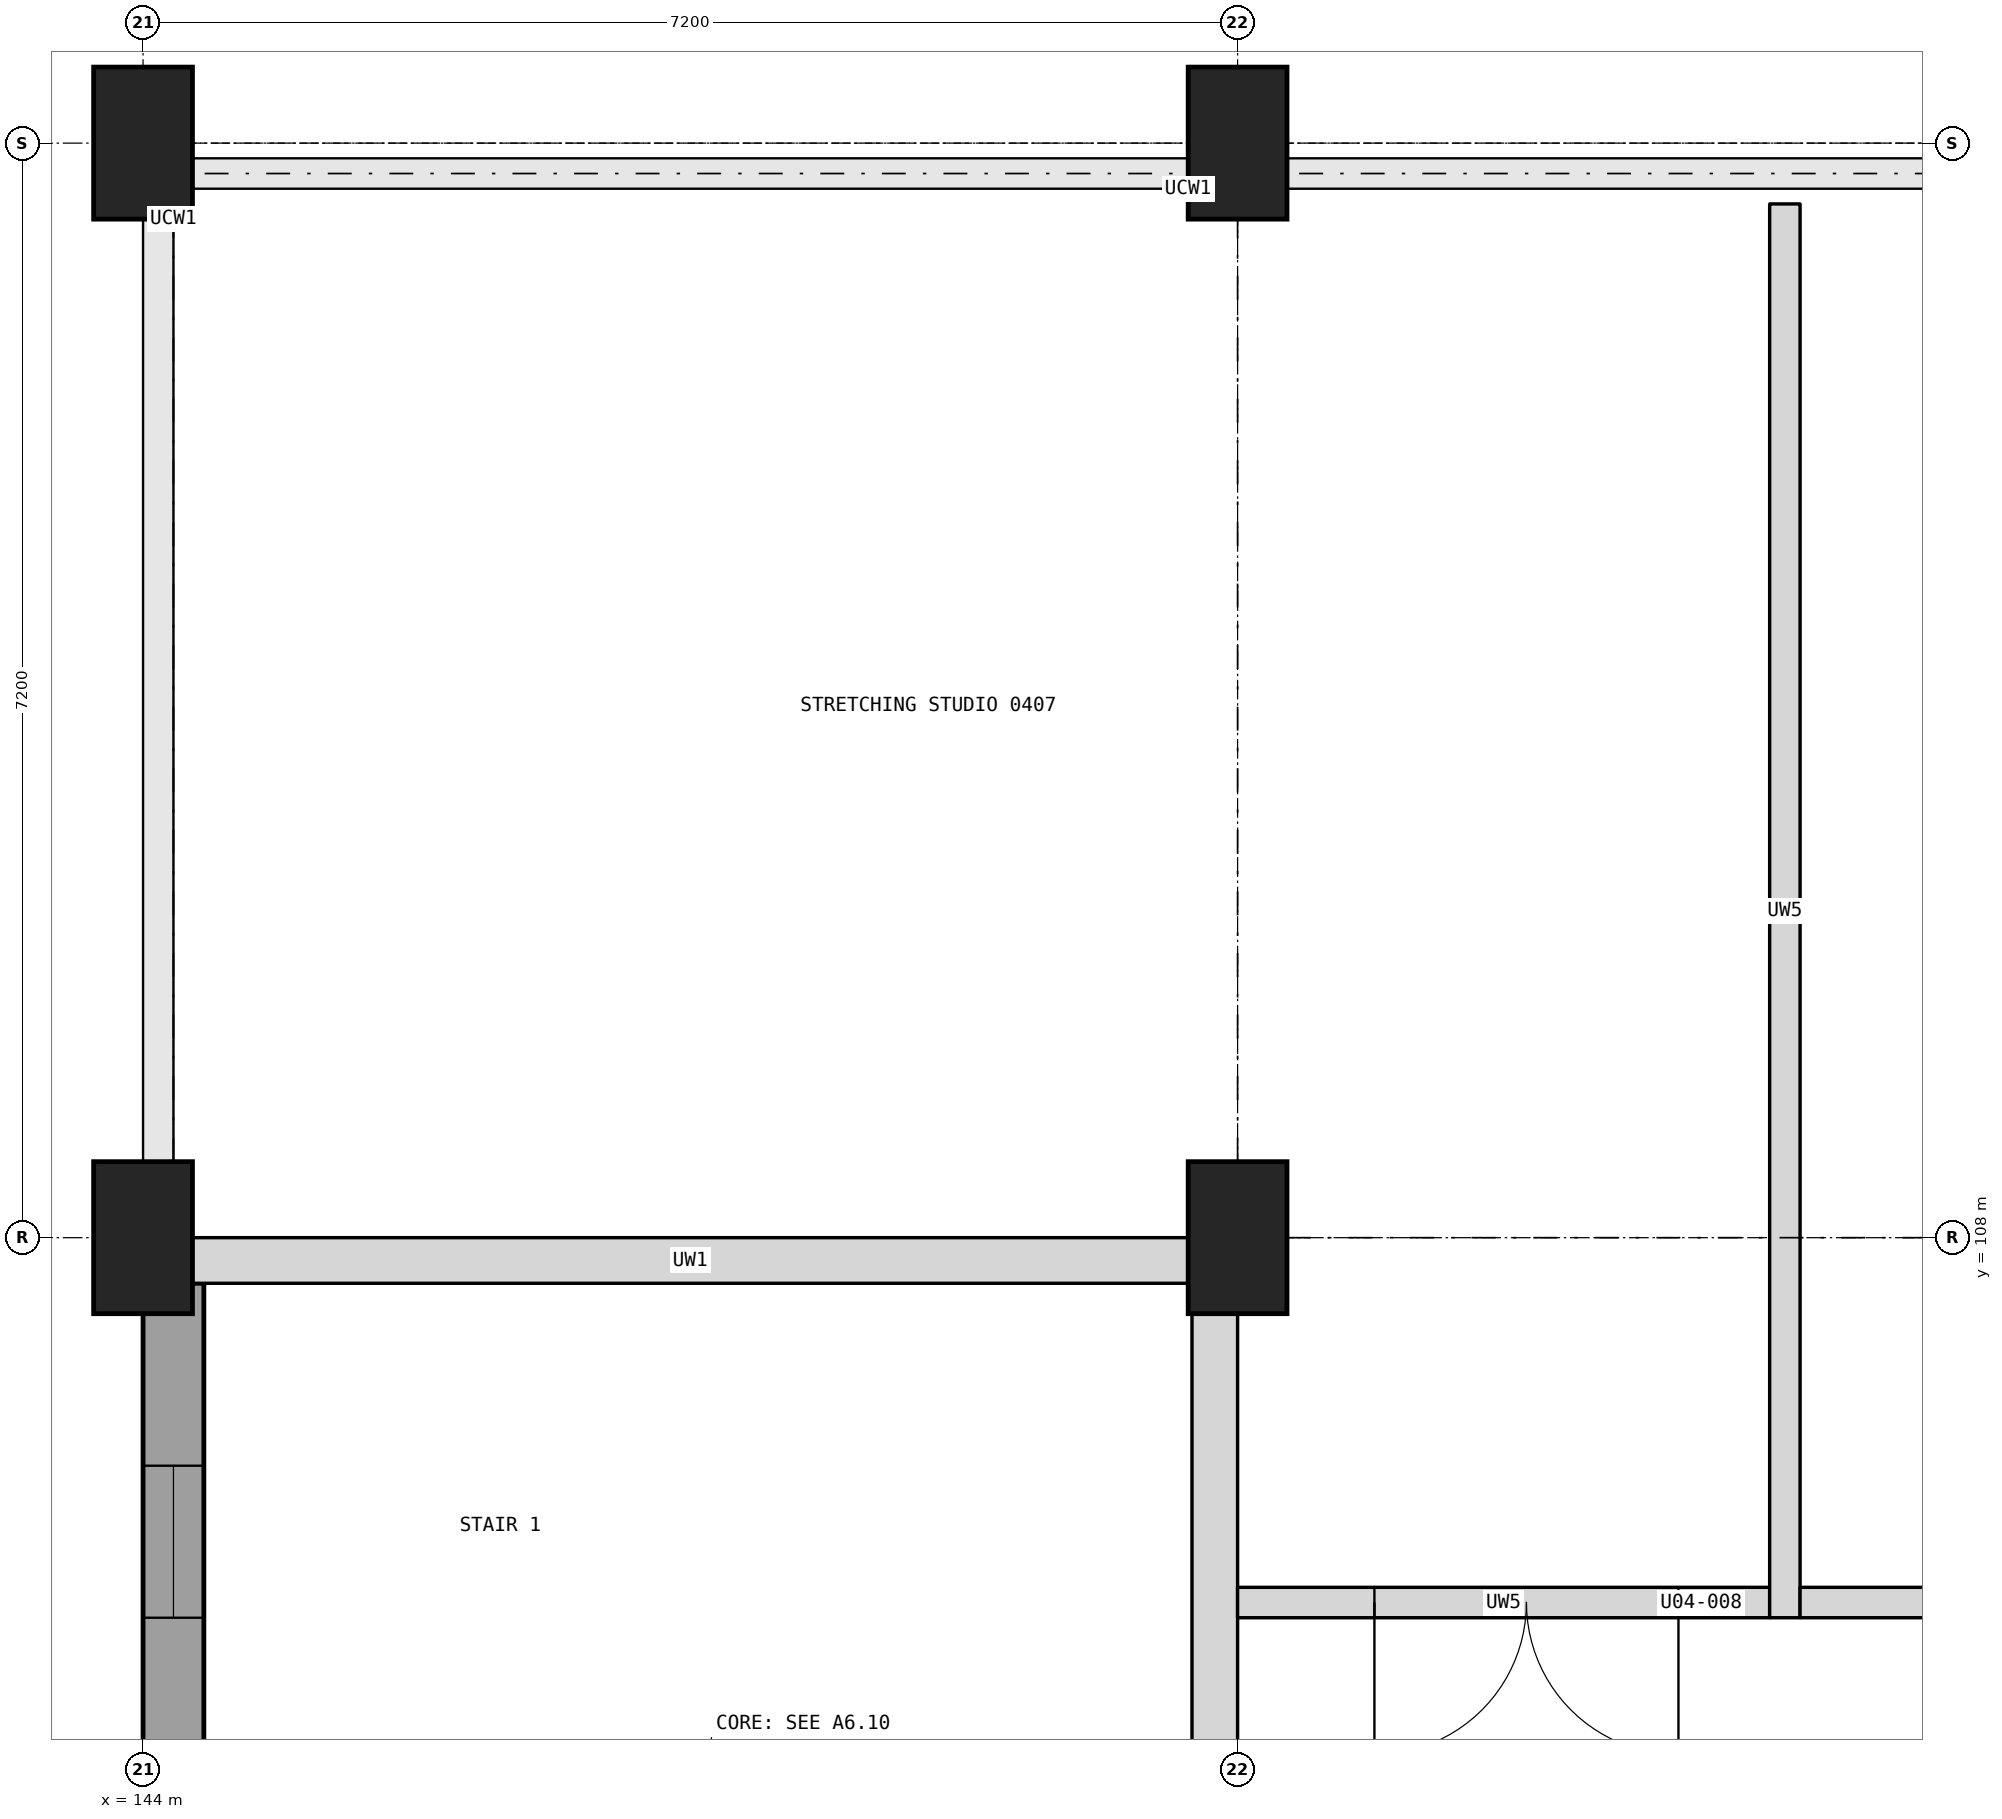
"""IFC4 building model, lengths in metres.
Left out: names, types, materials, properties, quantities, classifications, styles, units other than length and angle.
Written with IfcOpenShell. Run it as: python <this file> out.ifc"""

import sys

from ifc_helpers import new_model, si_unit, direction, frame, frame_2d, origin, origin_2d, place, context, subcontext, project, spatial, rectangle, extrude, element, fill, save


model = new_model("IFC4")
c1 = context("Model", 3, precision=1e-05, world=origin(), true_north=direction((0.0, 1.0)))
c2 = subcontext(c1, "Body", "Model", "MODEL_VIEW")
j1 = project(units=[si_unit("LENGTHUNIT", "METRE"), si_unit("PLANEANGLEUNIT", "RADIAN")], contexts=[c1])
p1 = place(None, origin())
s1 = spatial("IfcSite", under=j1, at=p1, CompositionType="ELEMENT")
p2 = place(p1, origin())
s2 = spatial("IfcBuilding", under=s1, at=p2, CompositionType="ELEMENT")
p3 = place(p2, frame((0.0, 0.0, 19.9)))
s3 = spatial("IfcBuildingStorey", under=s2, at=p3, CompositionType="ELEMENT", Elevation=19.9)
for number, where, z_axis, x_axis in (
    (1, (144.0, 108.0, 0.0), (0.0, 0.0, 1.0), (1.0, 0.0, 0.0)),
    (2, (144.0, 115.2, 0.0), (0.0, 0.0, 1.0), (1.0, 0.0, 0.0)),
    (3, (151.2, 108.0, 0.0), (0.0, 0.0, 1.0), (1.0, 0.0, 0.0)),
    (4, (151.2, 115.2, 0.0), (0.0, 0.0, 1.0), (1.0, 0.0, 0.0)),
):
    element("IfcColumn", number, at=place(p3, frame(where, z_axis=z_axis, x_axis=x_axis)), inside=s3, PredefinedType="COLUMN", context=c2, shape_type="SweptSolid", body=[
        extrude(rectangle(XDim=0.65, YDim=1.0, at=origin_2d()), origin(), (0.0, 0.0, 1.0), 3.4),
    ])
p4 = place(p3, frame((144.0, 107.85, 0.0), z_axis=(0.0, 0.0, 1.0), x_axis=(1.0, 0.0, 0.0)))
e5 = element("IfcWall", 5, at=p4, inside=s3, PredefinedType="SHEAR", context=c2, shape_type="SweptSolid", body=[
    extrude(rectangle(XDim=7.2, YDim=0.3, at=frame_2d((3.6, 0.0))), origin(), (0.0, 0.0, 1.0), 3.4),
])
p5 = place(p3, frame((151.05, 101.1, 0.0), z_axis=(0.0, 0.0, 1.0), x_axis=(0.0, 1.0, 0.0)))
e6 = element("IfcWall", 6, at=p5, inside=s3, PredefinedType="SHEAR", context=c2, shape_type="SweptSolid", body=[
    extrude(rectangle(XDim=6.6, YDim=0.3, at=frame_2d((3.3, 0.0))), origin(), (0.0, 0.0, 1.0), 3.4),
])
p6 = place(p5, frame((2.3, 0.0, 0.0)))
e7 = element("IfcOpeningElement", 7, at=p6, cuts=e6, PredefinedType="OPENING", context=c2, shape_type="SweptSolid", body=[
    extrude(rectangle(XDim=1.0, YDim=2.1, at=frame_2d((0.5, 1.05))), frame((0.0, 0.16, 0.0), z_axis=(0.0, -1.0, 0.0), x_axis=(1.0, 0.0, 0.0)), (0.0, 0.0, 1.0), 0.32),
])
p7 = place(p3, frame((144.2, 101.1, 0.0), z_axis=(0.0, 0.0, 1.0), x_axis=(0.0, 1.0, 0.0)))
e8 = element("IfcWall", 8, at=p7, inside=s3, PredefinedType="SHEAR", context=c2, shape_type="SweptSolid", body=[
    extrude(rectangle(XDim=6.6, YDim=0.4, at=frame_2d((3.3, 0.0))), origin(), (0.0, 0.0, 1.0), 3.4),
])
p8 = place(p7, frame((4.4, 0.0, 1.0)))
e9 = element("IfcOpeningElement", 9, at=p8, cuts=e8, PredefinedType="OPENING", context=c2, shape_type="SweptSolid", body=[
    extrude(rectangle(XDim=1.0, YDim=1.5, at=frame_2d((0.5, 0.75))), frame((0.0, 0.21, 0.0), z_axis=(0.0, -1.0, 0.0), x_axis=(1.0, 0.0, 0.0)), (0.0, 0.0, 1.0), 0.42),
])
p9 = place(p3, frame((151.2, 105.6, 0.0), z_axis=(0.0, 0.0, 1.0), x_axis=(1.0, 0.0, 0.0)))
e10 = element("IfcWall", 10, at=p9, inside=s3, PredefinedType="PARTITIONING", context=c2, shape_type="SweptSolid", body=[
    extrude(rectangle(XDim=3.5, YDim=0.2, at=frame_2d((1.75, 0.0))), origin(), (0.0, 0.0, 1.0), 3.1),
])
p10 = place(p9, frame((0.9, 0.0, 0.0)))
e11 = element("IfcOpeningElement", 11, at=p10, cuts=e10, PredefinedType="OPENING", context=c2, shape_type="SweptSolid", body=[
    extrude(rectangle(XDim=2.0, YDim=2.1, at=frame_2d((1.0, 1.05))), frame((0.0, 0.11, 0.0), z_axis=(0.0, -1.0, 0.0), x_axis=(1.0, 0.0, 0.0)), (0.0, 0.0, 1.0), 0.22),
])
p11 = place(p3, frame((154.8, 105.5, 0.0), z_axis=(0.0, 0.0, 1.0), x_axis=(0.0, 1.0, 0.0)))
e12 = element("IfcWall", 12, at=p11, inside=s3, PredefinedType="PARTITIONING", context=c2, shape_type="SweptSolid", body=[
    extrude(rectangle(XDim=9.3, YDim=0.2, at=frame_2d((4.65, 0.0))), origin(), (0.0, 0.0, 1.0), 3.1),
])
p12 = place(p3, frame((154.9, 105.6, 0.0), z_axis=(0.0, 0.0, 1.0), x_axis=(1.0, 0.0, 0.0)))
e13 = element("IfcWall", 13, at=p12, inside=s3, PredefinedType="PARTITIONING", context=c2, shape_type="SweptSolid", body=[
    extrude(rectangle(XDim=3.5, YDim=0.2, at=frame_2d((1.75, 0.0))), origin(), (0.0, 0.0, 1.0), 3.1),
])
p13 = place(p12, frame((0.9, 0.0, 0.0)))
e14 = element("IfcOpeningElement", 14, at=p13, cuts=e13, PredefinedType="OPENING", context=c2, shape_type="SweptSolid", body=[
    extrude(rectangle(XDim=2.0, YDim=2.1, at=frame_2d((1.0, 1.05))), frame((0.0, 0.11, 0.0), z_axis=(0.0, -1.0, 0.0), x_axis=(1.0, 0.0, 0.0)), (0.0, 0.0, 1.0), 0.22),
])
p14 = place(p8, origin())
e15 = element("IfcWindow", 15, at=p14, inside=s3, PartitioningType="SINGLE_PANEL", PredefinedType="WINDOW", context=c2, shape_type="SweptSolid", body=[
    extrude(rectangle(XDim=1.0, YDim=1.5, at=frame_2d((0.5, 0.75))), frame((0.0, 0.03, 0.0), z_axis=(0.0, -1.0, 0.0), x_axis=(1.0, 0.0, 0.0)), (0.0, 0.0, 1.0), 0.06),
])
fill(e9, e15)
p15 = place(p10, frame((2.0, 0.0, 0.0), z_axis=(0.0, 0.0, 1.0), x_axis=(-1.0, 0.0, 0.0)))
e16 = element("IfcDoor", 16, at=p15, inside=s3, OperationType="DOUBLE_DOOR_SINGLE_SWING", PredefinedType="DOOR", context=c2, shape_type="SweptSolid", body=[
    extrude(rectangle(XDim=2.0, YDim=2.1, at=frame_2d((1.0, 1.05))), frame((0.0, 0.025, 0.0), z_axis=(0.0, -1.0, 0.0), x_axis=(1.0, 0.0, 0.0)), (0.0, 0.0, 1.0), 0.05),
])
fill(e11, e16)
save(model, sys.argv[1])
